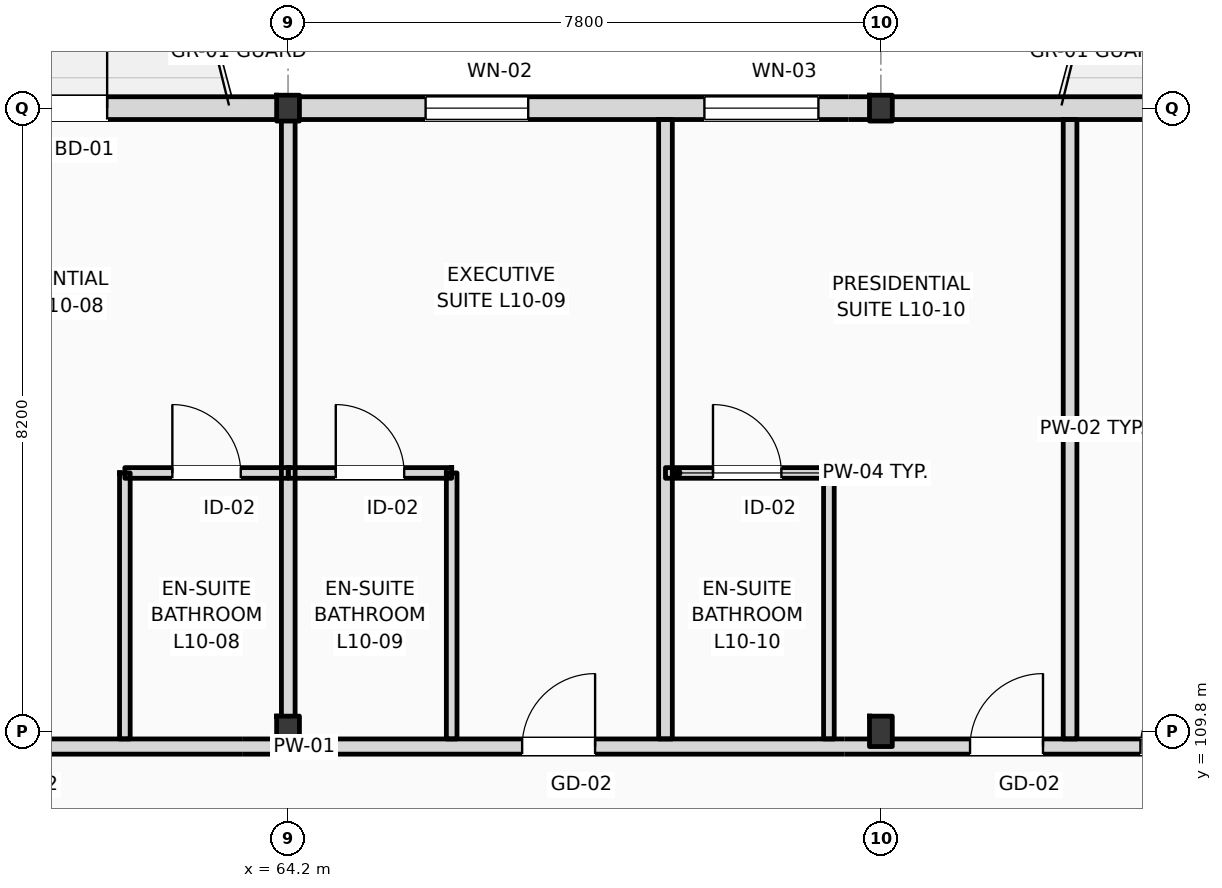
"""IFC4 building model, lengths in metres.
Left out: names, types, materials, properties, quantities, classifications, styles, units other than length and angle.
Written with IfcOpenShell. Run it as: python <this file> out.ifc"""

import sys

from ifc_helpers import new_model, si_unit, direction, frame, frame_2d, origin, origin_2d, place, context, subcontext, project, spatial, rectangle, i_section, extrude, element, fill, save


model = new_model("IFC4")
c1 = context("Model", 3, precision=1e-05, world=origin(), true_north=direction((0.0, 1.0)))
c2 = subcontext(c1, "Body", "Model", "MODEL_VIEW")
j1 = project(units=[si_unit("LENGTHUNIT", "METRE"), si_unit("PLANEANGLEUNIT", "RADIAN")], contexts=[c1])
p1 = place(None, origin())
s1 = spatial("IfcSite", under=j1, at=p1, CompositionType="ELEMENT")
p2 = place(p1, origin())
s2 = spatial("IfcBuilding", under=s1, at=p2, CompositionType="ELEMENT")
p3 = place(p2, frame((0.0, 0.0, 42.6)))
s3 = spatial("IfcBuildingStorey", under=s2, at=p3, CompositionType="ELEMENT", Elevation=42.6)
p4 = place(p3, frame((64.2, 109.8, 0.0), z_axis=(0.0, 0.0, 1.0), x_axis=(1.0, 0.0, 0.0)))
e1 = element("IfcColumn", 1, at=p4, inside=s3, PredefinedType="COLUMN", context=c2, shape_type="SweptSolid", body=[
    extrude(i_section(OverallWidth=0.3, OverallDepth=0.4, WebThickness=0.013, FlangeThickness=0.024, FilletRadius=0.027, at=origin_2d()), origin(), (0.0, 0.0, 1.0), 4.2),
])
p5 = place(p3, frame((64.2, 118.0, 0.0), z_axis=(0.0, 0.0, 1.0), x_axis=(1.0, 0.0, 0.0)))
e2 = element("IfcColumn", 2, at=p5, inside=s3, PredefinedType="COLUMN", context=c2, shape_type="SweptSolid", body=[
    extrude(i_section(OverallWidth=0.3, OverallDepth=0.34, WebThickness=0.012, FlangeThickness=0.021, FilletRadius=0.027, at=origin_2d()), origin(), (0.0, 0.0, 1.0), 4.2),
])
p6 = place(p3, frame((72.0, 109.8, 0.0), z_axis=(0.0, 0.0, 1.0), x_axis=(1.0, 0.0, 0.0)))
e3 = element("IfcColumn", 3, at=p6, inside=s3, PredefinedType="COLUMN", context=c2, shape_type="SweptSolid", body=[
    extrude(i_section(OverallWidth=0.3, OverallDepth=0.4, WebThickness=0.013, FlangeThickness=0.024, FilletRadius=0.027, at=origin_2d()), origin(), (0.0, 0.0, 1.0), 4.2),
])
p7 = place(p3, frame((72.0, 118.0, 0.0), z_axis=(0.0, 0.0, 1.0), x_axis=(1.0, 0.0, 0.0)))
e4 = element("IfcColumn", 4, at=p7, inside=s3, PredefinedType="COLUMN", context=c2, shape_type="SweptSolid", body=[
    extrude(i_section(OverallWidth=0.3, OverallDepth=0.34, WebThickness=0.012, FlangeThickness=0.021, FilletRadius=0.027, at=origin_2d()), origin(), (0.0, 0.0, 1.0), 4.2),
])
p8 = place(p3, frame((22.5, 118.0, 0.0), z_axis=(0.0, 0.0, 1.0), x_axis=(1.0, 0.0, 0.0)))
e5 = element("IfcWall", 5, at=p8, inside=s3, PredefinedType="STANDARD", context=c2, shape_type="SweptSolid", body=[
    extrude(rectangle(XDim=72.9, YDim=0.3, at=frame_2d((36.45, 0.0))), origin(), (0.0, 0.0, 1.0), 3.42),
])
p9 = place(p8, frame((3.611, 0.0, 0.9)))
e6 = element("IfcOpeningElement", 6, at=p9, cuts=e5, PredefinedType="OPENING", context=c2, shape_type="SweptSolid", body=[
    extrude(rectangle(XDim=1.35, YDim=1.75, at=frame_2d((0.675, 0.875))), frame((0.0, 0.16, 0.0), z_axis=(0.0, -1.0, 0.0), x_axis=(1.0, 0.0, 0.0)), (0.0, 0.0, 1.0), 0.32),
])
p10 = place(p8, frame((7.091, 0.0, 0.0)))
e7 = element("IfcOpeningElement", 7, at=p10, cuts=e5, PredefinedType="OPENING", context=c2, shape_type="SweptSolid", body=[
    extrude(rectangle(XDim=1.2, YDim=2.25, at=frame_2d((0.6, 1.125))), frame((0.0, 0.16, 0.0), z_axis=(0.0, -1.0, 0.0), x_axis=(1.0, 0.0, 0.0)), (0.0, 0.0, 1.0), 0.32),
])
p11 = place(p8, frame((12.328, 0.0, 0.9)))
e8 = element("IfcOpeningElement", 8, at=p11, cuts=e5, PredefinedType="OPENING", context=c2, shape_type="SweptSolid", body=[
    extrude(rectangle(XDim=2.0, YDim=2.34, at=frame_2d((1.0, 1.17))), frame((0.0, 0.16, 0.0), z_axis=(0.0, -1.0, 0.0), x_axis=(1.0, 0.0, 0.0)), (0.0, 0.0, 1.0), 0.32),
])
p12 = place(p8, frame((19.12, 0.0, 0.9)))
e9 = element("IfcOpeningElement", 9, at=p12, cuts=e5, PredefinedType="OPENING", context=c2, shape_type="SweptSolid", body=[
    extrude(rectangle(XDim=1.35, YDim=2.34, at=frame_2d((0.675, 1.17))), frame((0.0, 0.16, 0.0), z_axis=(0.0, -1.0, 0.0), x_axis=(1.0, 0.0, 0.0)), (0.0, 0.0, 1.0), 0.32),
])
p13 = place(p8, frame((22.696, 0.0, 0.0)))
e10 = element("IfcOpeningElement", 10, at=p13, cuts=e5, PredefinedType="OPENING", context=c2, shape_type="SweptSolid", body=[
    extrude(rectangle(XDim=1.2, YDim=2.25, at=frame_2d((0.6, 1.125))), frame((0.0, 0.16, 0.0), z_axis=(0.0, -1.0, 0.0), x_axis=(1.0, 0.0, 0.0)), (0.0, 0.0, 1.0), 0.32),
])
p14 = place(p8, frame((27.205, 0.0, 0.9)))
e11 = element("IfcOpeningElement", 11, at=p14, cuts=e5, PredefinedType="OPENING", context=c2, shape_type="SweptSolid", body=[
    extrude(rectangle(XDim=3.1, YDim=2.34, at=frame_2d((1.55, 1.17))), frame((0.0, 0.16, 0.0), z_axis=(0.0, -1.0, 0.0), x_axis=(1.0, 0.0, 0.0)), (0.0, 0.0, 1.0), 0.32),
])
p15 = place(p8, frame((31.948, 0.0, 0.9)))
e12 = element("IfcOpeningElement", 12, at=p15, cuts=e5, PredefinedType="OPENING", context=c2, shape_type="SweptSolid", body=[
    extrude(rectangle(XDim=1.1, YDim=2.34, at=frame_2d((0.55, 1.17))), frame((0.0, 0.16, 0.0), z_axis=(0.0, -1.0, 0.0), x_axis=(1.0, 0.0, 0.0)), (0.0, 0.0, 1.0), 0.32),
])
p16 = place(p8, frame((38.12, 0.0, 0.0)))
e13 = element("IfcOpeningElement", 13, at=p16, cuts=e5, PredefinedType="OPENING", context=c2, shape_type="SweptSolid", body=[
    extrude(rectangle(XDim=1.2, YDim=2.25, at=frame_2d((0.6, 1.125))), frame((0.0, 0.16, 0.0), z_axis=(0.0, -1.0, 0.0), x_axis=(1.0, 0.0, 0.0)), (0.0, 0.0, 1.0), 0.32),
])
p17 = place(p8, frame((43.51, 0.0, 0.9)))
e14 = element("IfcOpeningElement", 14, at=p17, cuts=e5, PredefinedType="OPENING", context=c2, shape_type="SweptSolid", body=[
    extrude(rectangle(XDim=1.35, YDim=1.85, at=frame_2d((0.675, 0.925))), frame((0.0, 0.16, 0.0), z_axis=(0.0, -1.0, 0.0), x_axis=(1.0, 0.0, 0.0)), (0.0, 0.0, 1.0), 0.32),
])
p18 = place(p8, frame((47.178, 0.0, 0.9)))
e15 = element("IfcOpeningElement", 15, at=p18, cuts=e5, PredefinedType="OPENING", context=c2, shape_type="SweptSolid", body=[
    extrude(rectangle(XDim=1.5, YDim=1.9, at=frame_2d((0.75, 0.95))), frame((0.0, 0.16, 0.0), z_axis=(0.0, -1.0, 0.0), x_axis=(1.0, 0.0, 0.0)), (0.0, 0.0, 1.0), 0.32),
])
p19 = place(p8, frame((53.724, 0.0, 0.0)))
e16 = element("IfcOpeningElement", 16, at=p19, cuts=e5, PredefinedType="OPENING", context=c2, shape_type="SweptSolid", body=[
    extrude(rectangle(XDim=1.2, YDim=2.25, at=frame_2d((0.6, 1.125))), frame((0.0, 0.16, 0.0), z_axis=(0.0, -1.0, 0.0), x_axis=(1.0, 0.0, 0.0)), (0.0, 0.0, 1.0), 0.32),
])
p20 = place(p8, frame((58.712, 0.0, 0.9)))
e17 = element("IfcOpeningElement", 17, at=p20, cuts=e5, PredefinedType="OPENING", context=c2, shape_type="SweptSolid", body=[
    extrude(rectangle(XDim=1.8, YDim=2.0, at=frame_2d((0.9, 1.0))), frame((0.0, 0.16, 0.0), z_axis=(0.0, -1.0, 0.0), x_axis=(1.0, 0.0, 0.0)), (0.0, 0.0, 1.0), 0.32),
])
p21 = place(p8, frame((62.781, 0.0, 0.9)))
e18 = element("IfcOpeningElement", 18, at=p21, cuts=e5, PredefinedType="OPENING", context=c2, shape_type="SweptSolid", body=[
    extrude(rectangle(XDim=1.35, YDim=2.05, at=frame_2d((0.675, 1.025))), frame((0.0, 0.16, 0.0), z_axis=(0.0, -1.0, 0.0), x_axis=(1.0, 0.0, 0.0)), (0.0, 0.0, 1.0), 0.32),
])
p22 = place(p8, frame((68.819, 0.0, 0.9)))
e19 = element("IfcOpeningElement", 19, at=p22, cuts=e5, PredefinedType="OPENING", context=c2, shape_type="SweptSolid", body=[
    extrude(rectangle(XDim=2.1, YDim=2.1, at=frame_2d((1.05, 1.05))), frame((0.0, 0.16, 0.0), z_axis=(0.0, -1.0, 0.0), x_axis=(1.0, 0.0, 0.0)), (0.0, 0.0, 1.0), 0.32),
])
p23 = place(p3, frame((10.65, 109.6, 0.0), z_axis=(0.0, 0.0, 1.0), x_axis=(1.0, 0.0, 0.0)))
e20 = element("IfcWall", 20, at=p23, inside=s3, PredefinedType="PARTITIONING", context=c2, shape_type="SweptSolid", body=[
    extrude(rectangle(XDim=84.61, YDim=0.2, at=frame_2d((42.305, 0.0))), origin(), (0.0, 0.0, 1.0), 3.38),
])
p24 = place(p23, frame((15.926, 0.0, 0.0)))
e21 = element("IfcOpeningElement", 21, at=p24, cuts=e20, PredefinedType="OPENING", context=c2, shape_type="SweptSolid", body=[
    extrude(rectangle(XDim=1.02, YDim=2.2, at=frame_2d((0.51, 1.1))), frame((0.0, 0.11, 0.0), z_axis=(0.0, -1.0, 0.0), x_axis=(1.0, 0.0, 0.0)), (0.0, 0.0, 1.0), 0.22),
])
p25 = place(p23, frame((18.45, 0.0, 0.0)))
e22 = element("IfcOpeningElement", 22, at=p25, cuts=e20, PredefinedType="OPENING", context=c2, shape_type="SweptSolid", body=[
    extrude(rectangle(XDim=1.02, YDim=2.2, at=frame_2d((0.51, 1.1))), frame((0.0, 0.11, 0.0), z_axis=(0.0, -1.0, 0.0), x_axis=(1.0, 0.0, 0.0)), (0.0, 0.0, 1.0), 0.22),
])
p26 = place(p23, frame((25.742, 0.0, 0.0)))
e23 = element("IfcOpeningElement", 23, at=p26, cuts=e20, PredefinedType="OPENING", context=c2, shape_type="SweptSolid", body=[
    extrude(rectangle(XDim=1.02, YDim=2.2, at=frame_2d((0.51, 1.1))), frame((0.0, 0.11, 0.0), z_axis=(0.0, -1.0, 0.0), x_axis=(1.0, 0.0, 0.0)), (0.0, 0.0, 1.0), 0.22),
])
p27 = place(p23, frame((31.385, 0.0, 0.0)))
e24 = element("IfcOpeningElement", 24, at=p27, cuts=e20, PredefinedType="OPENING", context=c2, shape_type="SweptSolid", body=[
    extrude(rectangle(XDim=1.02, YDim=2.2, at=frame_2d((0.51, 1.1))), frame((0.0, 0.11, 0.0), z_axis=(0.0, -1.0, 0.0), x_axis=(1.0, 0.0, 0.0)), (0.0, 0.0, 1.0), 0.22),
])
p28 = place(p23, frame((33.908, 0.0, 0.0)))
e25 = element("IfcOpeningElement", 25, at=p28, cuts=e20, PredefinedType="OPENING", context=c2, shape_type="SweptSolid", body=[
    extrude(rectangle(XDim=0.96, YDim=2.2, at=frame_2d((0.48, 1.1))), frame((0.0, 0.11, 0.0), z_axis=(0.0, -1.0, 0.0), x_axis=(1.0, 0.0, 0.0)), (0.0, 0.0, 1.0), 0.22),
])
p29 = place(p23, frame((41.201, 0.0, 0.0)))
e26 = element("IfcOpeningElement", 26, at=p29, cuts=e20, PredefinedType="OPENING", context=c2, shape_type="SweptSolid", body=[
    extrude(rectangle(XDim=0.96, YDim=2.2, at=frame_2d((0.48, 1.1))), frame((0.0, 0.11, 0.0), z_axis=(0.0, -1.0, 0.0), x_axis=(1.0, 0.0, 0.0)), (0.0, 0.0, 1.0), 0.22),
])
p30 = place(p23, frame((46.844, 0.0, 0.0)))
e27 = element("IfcOpeningElement", 27, at=p30, cuts=e20, PredefinedType="OPENING", context=c2, shape_type="SweptSolid", body=[
    extrude(rectangle(XDim=0.96, YDim=2.2, at=frame_2d((0.48, 1.1))), frame((0.0, 0.11, 0.0), z_axis=(0.0, -1.0, 0.0), x_axis=(1.0, 0.0, 0.0)), (0.0, 0.0, 1.0), 0.22),
])
p31 = place(p23, frame((49.337, 0.0, 0.0)))
e28 = element("IfcOpeningElement", 28, at=p31, cuts=e20, PredefinedType="OPENING", context=c2, shape_type="SweptSolid", body=[
    extrude(rectangle(XDim=0.96, YDim=2.2, at=frame_2d((0.48, 1.1))), frame((0.0, 0.11, 0.0), z_axis=(0.0, -1.0, 0.0), x_axis=(1.0, 0.0, 0.0)), (0.0, 0.0, 1.0), 0.22),
])
p32 = place(p23, frame((56.63, 0.0, 0.0)))
e29 = element("IfcOpeningElement", 29, at=p32, cuts=e20, PredefinedType="OPENING", context=c2, shape_type="SweptSolid", body=[
    extrude(rectangle(XDim=0.96, YDim=2.2, at=frame_2d((0.48, 1.1))), frame((0.0, 0.11, 0.0), z_axis=(0.0, -1.0, 0.0), x_axis=(1.0, 0.0, 0.0)), (0.0, 0.0, 1.0), 0.22),
])
p33 = place(p23, frame((62.523, 0.0, 0.0)))
e30 = element("IfcOpeningElement", 30, at=p33, cuts=e20, PredefinedType="OPENING", context=c2, shape_type="SweptSolid", body=[
    extrude(rectangle(XDim=0.96, YDim=2.2, at=frame_2d((0.48, 1.1))), frame((0.0, 0.11, 0.0), z_axis=(0.0, -1.0, 0.0), x_axis=(1.0, 0.0, 0.0)), (0.0, 0.0, 1.0), 0.22),
])
p34 = place(p23, frame((64.765, 0.0, 0.0)))
e31 = element("IfcOpeningElement", 31, at=p34, cuts=e20, PredefinedType="OPENING", context=c2, shape_type="SweptSolid", body=[
    extrude(rectangle(XDim=0.96, YDim=2.2, at=frame_2d((0.48, 1.1))), frame((0.0, 0.11, 0.0), z_axis=(0.0, -1.0, 0.0), x_axis=(1.0, 0.0, 0.0)), (0.0, 0.0, 1.0), 0.22),
])
p35 = place(p23, frame((72.057, 0.0, 0.0)))
e32 = element("IfcOpeningElement", 32, at=p35, cuts=e20, PredefinedType="OPENING", context=c2, shape_type="SweptSolid", body=[
    extrude(rectangle(XDim=0.96, YDim=2.2, at=frame_2d((0.48, 1.1))), frame((0.0, 0.11, 0.0), z_axis=(0.0, -1.0, 0.0), x_axis=(1.0, 0.0, 0.0)), (0.0, 0.0, 1.0), 0.22),
])
p36 = place(p23, frame((74.55, 0.0, 0.0)))
e33 = element("IfcOpeningElement", 33, at=p36, cuts=e20, PredefinedType="OPENING", context=c2, shape_type="SweptSolid", body=[
    extrude(rectangle(XDim=0.96, YDim=2.2, at=frame_2d((0.48, 1.1))), frame((0.0, 0.11, 0.0), z_axis=(0.0, -1.0, 0.0), x_axis=(1.0, 0.0, 0.0)), (0.0, 0.0, 1.0), 0.22),
])
p37 = place(p23, frame((80.163, 0.0, 0.0)))
e34 = element("IfcOpeningElement", 34, at=p37, cuts=e20, PredefinedType="OPENING", context=c2, shape_type="SweptSolid", body=[
    extrude(rectangle(XDim=0.96, YDim=2.2, at=frame_2d((0.48, 1.1))), frame((0.0, 0.11, 0.0), z_axis=(0.0, -1.0, 0.0), x_axis=(1.0, 0.0, 0.0)), (0.0, 0.0, 1.0), 0.22),
])
p38 = place(p23, frame((2.716, 0.0, 0.0)))
e35 = element("IfcOpeningElement", 35, at=p38, cuts=e20, PredefinedType="OPENING", context=c2, shape_type="SweptSolid", body=[
    extrude(rectangle(XDim=1.35, YDim=2.25, at=frame_2d((0.675, 1.125))), frame((0.0, 0.11, 0.0), z_axis=(0.0, -1.0, 0.0), x_axis=(1.0, 0.0, 0.0)), (0.0, 0.0, 1.0), 0.22),
])
p39 = place(p23, frame((6.65, 0.0, 0.0)))
e36 = element("IfcOpeningElement", 36, at=p39, cuts=e20, PredefinedType="OPENING", context=c2, shape_type="SweptSolid", body=[
    extrude(rectangle(XDim=1.35, YDim=2.25, at=frame_2d((0.675, 1.125))), frame((0.0, 0.11, 0.0), z_axis=(0.0, -1.0, 0.0), x_axis=(1.0, 0.0, 0.0)), (0.0, 0.0, 1.0), 0.22),
])
p40 = place(p23, frame((10.583, 0.0, 0.0)))
e37 = element("IfcOpeningElement", 37, at=p40, cuts=e20, PredefinedType="OPENING", context=c2, shape_type="SweptSolid", body=[
    extrude(rectangle(XDim=1.35, YDim=2.25, at=frame_2d((0.675, 1.125))), frame((0.0, 0.11, 0.0), z_axis=(0.0, -1.0, 0.0), x_axis=(1.0, 0.0, 0.0)), (0.0, 0.0, 1.0), 0.22),
])
p41 = place(p3, frame((64.203, 109.7, 0.0), z_axis=(0.0, 0.0, 1.0), x_axis=(0.0, 1.0, 0.0)))
e38 = element("IfcWall", 38, at=p41, inside=s3, PredefinedType="PARTITIONING", context=c2, shape_type="SweptSolid", body=[
    extrude(rectangle(XDim=8.15, YDim=0.18, at=frame_2d((4.075, 0.0))), origin(), (0.0, 0.0, 1.0), 3.57),
])
p42 = place(p3, frame((62.053, 109.7, 0.0), z_axis=(0.0, 0.0, 1.0), x_axis=(0.0, 1.0, 0.0)))
e39 = element("IfcWall", 39, at=p42, inside=s3, PredefinedType="PARTITIONING", context=c2, shape_type="SweptSolid", body=[
    extrude(rectangle(XDim=3.5, YDim=0.14, at=frame_2d((1.75, 0.0))), origin(), (0.0, 0.0, 1.0), 3.94),
])
p43 = place(p3, frame((62.053, 113.2, 0.0), z_axis=(0.0, 0.0, 1.0), x_axis=(1.0, 0.0, 0.0)))
e40 = element("IfcWall", 40, at=p43, inside=s3, PredefinedType="PARTITIONING", context=c2, shape_type="SweptSolid", body=[
    extrude(rectangle(XDim=2.15, YDim=0.14, at=frame_2d((1.075, 0.0))), origin(), (0.0, 0.0, 1.0), 3.94),
])
p44 = place(p43, frame((0.625, 0.0, 0.0)))
e41 = element("IfcOpeningElement", 41, at=p44, cuts=e40, PredefinedType="OPENING", context=c2, shape_type="SweptSolid", body=[
    extrude(rectangle(XDim=0.9, YDim=2.1, at=frame_2d((0.45, 1.05))), frame((0.0, 0.08, 0.0), z_axis=(0.0, -1.0, 0.0), x_axis=(1.0, 0.0, 0.0)), (0.0, 0.0, 1.0), 0.16),
])
p45 = place(p3, frame((69.166, 109.7, 0.0), z_axis=(0.0, 0.0, 1.0), x_axis=(0.0, 1.0, 0.0)))
e42 = element("IfcWall", 42, at=p45, inside=s3, PredefinedType="PARTITIONING", context=c2, shape_type="SweptSolid", body=[
    extrude(rectangle(XDim=8.15, YDim=0.18, at=frame_2d((4.075, 0.0))), origin(), (0.0, 0.0, 1.0), 3.63),
])
p46 = place(p3, frame((66.353, 109.7, 0.0), z_axis=(0.0, 0.0, 1.0), x_axis=(0.0, 1.0, 0.0)))
e43 = element("IfcWall", 43, at=p46, inside=s3, PredefinedType="PARTITIONING", context=c2, shape_type="SweptSolid", body=[
    extrude(rectangle(XDim=3.5, YDim=0.14, at=frame_2d((1.75, 0.0))), origin(), (0.0, 0.0, 1.0), 3.94),
])
p47 = place(p3, frame((64.203, 113.2, 0.0), z_axis=(0.0, 0.0, 1.0), x_axis=(1.0, 0.0, 0.0)))
e44 = element("IfcWall", 44, at=p47, inside=s3, PredefinedType="PARTITIONING", context=c2, shape_type="SweptSolid", body=[
    extrude(rectangle(XDim=2.15, YDim=0.14, at=frame_2d((1.075, 0.0))), origin(), (0.0, 0.0, 1.0), 3.94),
])
p48 = place(p47, frame((0.625, 0.0, 0.0)))
e45 = element("IfcOpeningElement", 45, at=p48, cuts=e44, PredefinedType="OPENING", context=c2, shape_type="SweptSolid", body=[
    extrude(rectangle(XDim=0.9, YDim=2.1, at=frame_2d((0.45, 1.05))), frame((0.0, 0.08, 0.0), z_axis=(0.0, -1.0, 0.0), x_axis=(1.0, 0.0, 0.0)), (0.0, 0.0, 1.0), 0.16),
])
p49 = place(p3, frame((74.489, 109.7, 0.0), z_axis=(0.0, 0.0, 1.0), x_axis=(0.0, 1.0, 0.0)))
e46 = element("IfcWall", 46, at=p49, inside=s3, PredefinedType="PARTITIONING", context=c2, shape_type="SweptSolid", body=[
    extrude(rectangle(XDim=8.15, YDim=0.18, at=frame_2d((4.075, 0.0))), origin(), (0.0, 0.0, 1.0), 3.63),
])
p50 = place(p3, frame((71.316, 109.7, 0.0), z_axis=(0.0, 0.0, 1.0), x_axis=(0.0, 1.0, 0.0)))
e47 = element("IfcWall", 47, at=p50, inside=s3, PredefinedType="PARTITIONING", context=c2, shape_type="SweptSolid", body=[
    extrude(rectangle(XDim=3.5, YDim=0.14, at=frame_2d((1.75, 0.0))), origin(), (0.0, 0.0, 1.0), 3.94),
])
p51 = place(p3, frame((69.166, 113.2, 0.0), z_axis=(0.0, 0.0, 1.0), x_axis=(1.0, 0.0, 0.0)))
e48 = element("IfcWall", 48, at=p51, inside=s3, PredefinedType="PARTITIONING", context=c2, shape_type="SweptSolid", body=[
    extrude(rectangle(XDim=2.15, YDim=0.14, at=frame_2d((1.075, 0.0))), origin(), (0.0, 0.0, 1.0), 3.94),
])
p52 = place(p51, frame((0.625, 0.0, 0.0)))
e49 = element("IfcOpeningElement", 49, at=p52, cuts=e48, PredefinedType="OPENING", context=c2, shape_type="SweptSolid", body=[
    extrude(rectangle(XDim=0.9, YDim=2.1, at=frame_2d((0.45, 1.05))), frame((0.0, 0.08, 0.0), z_axis=(0.0, -1.0, 0.0), x_axis=(1.0, 0.0, 0.0)), (0.0, 0.0, 1.0), 0.16),
])
p53 = place(p16, origin())
e50 = element("IfcDoor", 50, at=p53, inside=s3, OperationType="SINGLE_SWING_RIGHT", PredefinedType="DOOR", context=c2, shape_type="SweptSolid", body=[
    extrude(rectangle(XDim=1.2, YDim=2.25, at=frame_2d((0.6, 1.125))), frame((0.0, 0.025, 0.0), z_axis=(0.0, -1.0, 0.0), x_axis=(1.0, 0.0, 0.0)), (0.0, 0.0, 1.0), 0.05),
])
fill(e13, e50)
p54 = place(p17, origin())
e51 = element("IfcWindow", 51, at=p54, inside=s3, PartitioningType="DOUBLE_PANEL_VERTICAL", PredefinedType="WINDOW", context=c2, shape_type="SweptSolid", body=[
    extrude(rectangle(XDim=1.35, YDim=1.85, at=frame_2d((0.675, 0.925))), frame((0.0, 0.03, 0.0), z_axis=(0.0, -1.0, 0.0), x_axis=(1.0, 0.0, 0.0)), (0.0, 0.0, 1.0), 0.06),
])
fill(e14, e51)
p55 = place(p18, origin())
e52 = element("IfcWindow", 52, at=p55, inside=s3, PartitioningType="DOUBLE_PANEL_VERTICAL", PredefinedType="WINDOW", context=c2, shape_type="SweptSolid", body=[
    extrude(rectangle(XDim=1.5, YDim=1.9, at=frame_2d((0.75, 0.95))), frame((0.0, 0.03, 0.0), z_axis=(0.0, -1.0, 0.0), x_axis=(1.0, 0.0, 0.0)), (0.0, 0.0, 1.0), 0.06),
])
fill(e15, e52)
p56 = place(p44, origin())
e53 = element("IfcDoor", 53, at=p56, inside=s3, OperationType="SINGLE_SWING_LEFT", PredefinedType="DOOR", context=c2, shape_type="SweptSolid", body=[
    extrude(rectangle(XDim=0.9, YDim=2.1, at=frame_2d((0.45, 1.05))), frame((0.0, 0.025, 0.0), z_axis=(0.0, -1.0, 0.0), x_axis=(1.0, 0.0, 0.0)), (0.0, 0.0, 1.0), 0.05),
])
fill(e41, e53)
p57 = place(p32, origin())
e54 = element("IfcDoor", 54, at=p57, inside=s3, OperationType="SINGLE_SWING_RIGHT", PredefinedType="DOOR", context=c2, shape_type="SweptSolid", body=[
    extrude(rectangle(XDim=0.96, YDim=2.2, at=frame_2d((0.48, 1.1))), frame((0.0, 0.025, 0.0), z_axis=(0.0, -1.0, 0.0), x_axis=(1.0, 0.0, 0.0)), (0.0, 0.0, 1.0), 0.05),
])
fill(e29, e54)
p58 = place(p48, origin())
e55 = element("IfcDoor", 55, at=p58, inside=s3, OperationType="SINGLE_SWING_LEFT", PredefinedType="DOOR", context=c2, shape_type="SweptSolid", body=[
    extrude(rectangle(XDim=0.9, YDim=2.1, at=frame_2d((0.45, 1.05))), frame((0.0, 0.025, 0.0), z_axis=(0.0, -1.0, 0.0), x_axis=(1.0, 0.0, 0.0)), (0.0, 0.0, 1.0), 0.05),
])
fill(e45, e55)
p59 = place(p33, origin())
e56 = element("IfcDoor", 56, at=p59, inside=s3, OperationType="SINGLE_SWING_RIGHT", PredefinedType="DOOR", context=c2, shape_type="SweptSolid", body=[
    extrude(rectangle(XDim=0.96, YDim=2.2, at=frame_2d((0.48, 1.1))), frame((0.0, 0.025, 0.0), z_axis=(0.0, -1.0, 0.0), x_axis=(1.0, 0.0, 0.0)), (0.0, 0.0, 1.0), 0.05),
])
fill(e30, e56)
p60 = place(p52, origin())
e57 = element("IfcDoor", 57, at=p60, inside=s3, OperationType="SINGLE_SWING_LEFT", PredefinedType="DOOR", context=c2, shape_type="SweptSolid", body=[
    extrude(rectangle(XDim=0.9, YDim=2.1, at=frame_2d((0.45, 1.05))), frame((0.0, 0.025, 0.0), z_axis=(0.0, -1.0, 0.0), x_axis=(1.0, 0.0, 0.0)), (0.0, 0.0, 1.0), 0.05),
])
fill(e49, e57)
p61 = place(p34, origin())
e58 = element("IfcDoor", 58, at=p61, inside=s3, OperationType="SINGLE_SWING_RIGHT", PredefinedType="DOOR", context=c2, shape_type="SweptSolid", body=[
    extrude(rectangle(XDim=0.96, YDim=2.2, at=frame_2d((0.48, 1.1))), frame((0.0, 0.025, 0.0), z_axis=(0.0, -1.0, 0.0), x_axis=(1.0, 0.0, 0.0)), (0.0, 0.0, 1.0), 0.05),
])
fill(e31, e58)
save(model, sys.argv[1])
